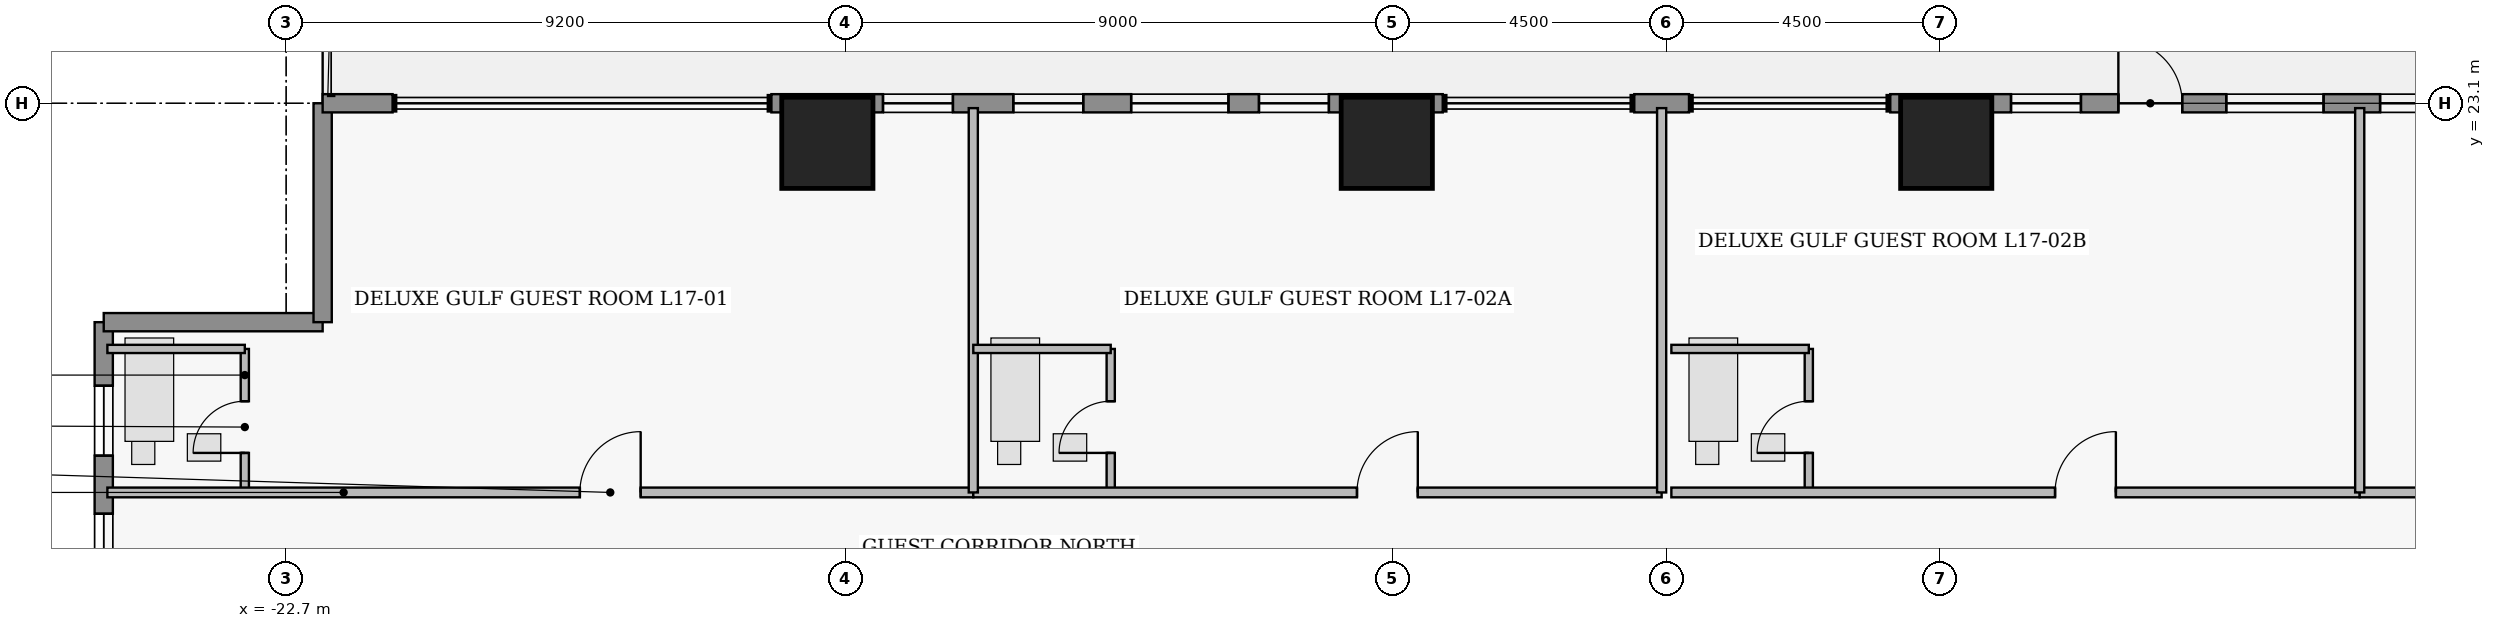
"""IFC4 building model, lengths in metres.
Left out: names, types, materials, properties, quantities, classifications, styles, units other than length and angle.
Written with IfcOpenShell. Run it as: python <this file> out.ifc"""

import sys

from ifc_helpers import new_model, si_unit, direction, frame, frame_2d, origin, origin_2d, place, context, subcontext, project, spatial, rectangle, extrude, element, fill, save


model = new_model("IFC4")
c1 = context("Model", 3, precision=1e-05, world=origin(), true_north=direction((0.0, 1.0)))
c2 = subcontext(c1, "Body", "Model", "MODEL_VIEW")
j1 = project(units=[si_unit("LENGTHUNIT", "METRE"), si_unit("PLANEANGLEUNIT", "RADIAN")], contexts=[c1])
p1 = place(None, origin())
s1 = spatial("IfcSite", under=j1, at=p1, CompositionType="ELEMENT")
p2 = place(p1, origin())
s2 = spatial("IfcBuilding", under=s1, at=p2, CompositionType="ELEMENT")
p3 = place(p2, frame((0.0, 0.0, 71.4)))
s3 = spatial("IfcBuildingStorey", under=s2, at=p3, CompositionType="ELEMENT", Elevation=71.4)
for number, where, z_axis, x_axis in (
    (1, (-13.8, 22.45, 0.0), (0.0, 0.0, 1.0), (1.0, 0.0, 0.0)),
    (2, (-4.6, 22.45, 0.0), (0.0, 0.0, 1.0), (1.0, 0.0, 0.0)),
    (3, (4.6, 22.45, 0.0), (0.0, 0.0, 1.0), (1.0, 0.0, 0.0)),
):
    element("IfcColumn", number, at=place(p3, frame(where, z_axis=z_axis, x_axis=x_axis)), inside=s3, PredefinedType="COLUMN", context=c2, shape_type="SweptSolid", body=[
        extrude(rectangle(XDim=1.5, YDim=1.5, at=origin_2d()), origin(), (0.0, 0.0, 1.0), 3.65),
    ])
p4 = place(p3, frame((-25.7, 14.4, 0.0), z_axis=(0.0, 0.0, 1.0), x_axis=(0.0, 1.0, 0.0)))
e4 = element("IfcWall", 4, at=p4, inside=s3, PredefinedType="STANDARD", context=c2, shape_type="SweptSolid", body=[
    extrude(rectangle(XDim=5.1, YDim=0.3, at=frame_2d((2.55, 0.0))), origin(), (0.0, 0.0, 1.0), 3.43),
])
p5 = place(p4, frame((0.8, 0.0, 0.95)))
e5 = element("IfcOpeningElement", 5, at=p5, cuts=e4, PredefinedType="OPENING", context=c2, shape_type="SweptSolid", body=[
    extrude(rectangle(XDim=1.15, YDim=1.55, at=frame_2d((0.575, 0.775))), frame((0.0, 0.16, 0.0), z_axis=(0.0, -1.0, 0.0), x_axis=(1.0, 0.0, 0.0)), (0.0, 0.0, 1.0), 0.32),
])
p6 = place(p4, frame((2.905, 0.0, 0.95)))
e6 = element("IfcOpeningElement", 6, at=p6, cuts=e4, PredefinedType="OPENING", context=c2, shape_type="SweptSolid", body=[
    extrude(rectangle(XDim=1.15, YDim=1.55, at=frame_2d((0.575, 0.775))), frame((0.0, 0.16, 0.0), z_axis=(0.0, -1.0, 0.0), x_axis=(1.0, 0.0, 0.0)), (0.0, 0.0, 1.0), 0.32),
])
p7 = place(p3, frame((-25.7, 19.5, 0.0), z_axis=(0.0, 0.0, 1.0), x_axis=(1.0, 0.0, 0.0)))
e7 = element("IfcWall", 7, at=p7, inside=s3, PredefinedType="STANDARD", context=c2, shape_type="SweptSolid", body=[
    extrude(rectangle(XDim=3.6, YDim=0.3, at=frame_2d((1.8, 0.0))), origin(), (0.0, 0.0, 1.0), 3.43),
])
p8 = place(p3, frame((-22.1, 19.5, 0.0), z_axis=(0.0, 0.0, 1.0), x_axis=(0.0, 1.0, 0.0)))
e8 = element("IfcWall", 8, at=p8, inside=s3, PredefinedType="STANDARD", context=c2, shape_type="SweptSolid", body=[
    extrude(rectangle(XDim=3.6, YDim=0.3, at=frame_2d((1.8, 0.0))), origin(), (0.0, 0.0, 1.0), 3.43),
])
p9 = place(p3, frame((-22.1, 23.1, 0.0), z_axis=(0.0, 0.0, 1.0), x_axis=(1.0, 0.0, 0.0)))
e9 = element("IfcWall", 9, at=p9, inside=s3, PredefinedType="STANDARD", context=c2, shape_type="SweptSolid", body=[
    extrude(rectangle(XDim=1.15, YDim=0.3, at=frame_2d((0.575, 0.0))), origin(), (0.0, 0.0, 1.0), 3.43),
])
p10 = place(p3, frame((-14.72, 23.1, 0.0), z_axis=(0.0, 0.0, 1.0), x_axis=(1.0, 0.0, 0.0)))
e10 = element("IfcWall", 10, at=p10, inside=s3, PredefinedType="STANDARD", context=c2, shape_type="SweptSolid", body=[
    extrude(rectangle(XDim=11.04, YDim=0.3, at=frame_2d((5.52, 0.0))), origin(), (0.0, 0.0, 1.0), 3.43),
])
p11 = place(p10, frame((5.916, 0.0, 0.85)))
e11 = element("IfcOpeningElement", 11, at=p11, cuts=e10, PredefinedType="OPENING", context=c2, shape_type="SweptSolid", body=[
    extrude(rectangle(XDim=1.6, YDim=1.8, at=frame_2d((0.8, 0.9))), frame((0.0, 0.16, 0.0), z_axis=(0.0, -1.0, 0.0), x_axis=(1.0, 0.0, 0.0)), (0.0, 0.0, 1.0), 0.32),
])
p12 = place(p10, frame((1.835, 0.0, 0.95)))
e12 = element("IfcOpeningElement", 12, at=p12, cuts=e10, PredefinedType="OPENING", context=c2, shape_type="SweptSolid", body=[
    extrude(rectangle(XDim=1.15, YDim=1.55, at=frame_2d((0.575, 0.775))), frame((0.0, 0.16, 0.0), z_axis=(0.0, -1.0, 0.0), x_axis=(1.0, 0.0, 0.0)), (0.0, 0.0, 1.0), 0.32),
])
p13 = place(p10, frame((3.978, 0.0, 0.95)))
e13 = element("IfcOpeningElement", 13, at=p13, cuts=e10, PredefinedType="OPENING", context=c2, shape_type="SweptSolid", body=[
    extrude(rectangle(XDim=1.15, YDim=1.55, at=frame_2d((0.575, 0.775))), frame((0.0, 0.16, 0.0), z_axis=(0.0, -1.0, 0.0), x_axis=(1.0, 0.0, 0.0)), (0.0, 0.0, 1.0), 0.32),
])
p14 = place(p10, frame((8.018, 0.0, 0.95)))
e14 = element("IfcOpeningElement", 14, at=p14, cuts=e10, PredefinedType="OPENING", context=c2, shape_type="SweptSolid", body=[
    extrude(rectangle(XDim=1.15, YDim=1.55, at=frame_2d((0.575, 0.775))), frame((0.0, 0.16, 0.0), z_axis=(0.0, -1.0, 0.0), x_axis=(1.0, 0.0, 0.0)), (0.0, 0.0, 1.0), 0.32),
])
p15 = place(p3, frame((-0.53, 23.1, 0.0), z_axis=(0.0, 0.0, 1.0), x_axis=(1.0, 0.0, 0.0)))
e15 = element("IfcWall", 15, at=p15, inside=s3, PredefinedType="STANDARD", context=c2, shape_type="SweptSolid", body=[
    extrude(rectangle(XDim=0.9, YDim=0.3, at=frame_2d((0.45, 0.0))), origin(), (0.0, 0.0, 1.0), 3.43),
])
p16 = place(p3, frame((3.68, 23.1, 0.0), z_axis=(0.0, 0.0, 1.0), x_axis=(1.0, 0.0, 0.0)))
e16 = element("IfcWall", 16, at=p16, inside=s3, PredefinedType="STANDARD", context=c2, shape_type="SweptSolid", body=[
    extrude(rectangle(XDim=11.04, YDim=0.3, at=frame_2d((5.52, 0.0))), origin(), (0.0, 0.0, 1.0), 3.43),
])
p17 = place(p16, frame((3.751, 0.0, 0.0)))
e17 = element("IfcOpeningElement", 17, at=p17, cuts=e16, PredefinedType="OPENING", context=c2, shape_type="SweptSolid", body=[
    extrude(rectangle(XDim=1.05, YDim=2.2, at=frame_2d((0.525, 1.1))), frame((0.0, 0.16, 0.0), z_axis=(0.0, -1.0, 0.0), x_axis=(1.0, 0.0, 0.0)), (0.0, 0.0, 1.0), 0.32),
])
p18 = place(p16, frame((1.986, 0.0, 0.95)))
e18 = element("IfcOpeningElement", 18, at=p18, cuts=e16, PredefinedType="OPENING", context=c2, shape_type="SweptSolid", body=[
    extrude(rectangle(XDim=1.15, YDim=1.55, at=frame_2d((0.575, 0.775))), frame((0.0, 0.16, 0.0), z_axis=(0.0, -1.0, 0.0), x_axis=(1.0, 0.0, 0.0)), (0.0, 0.0, 1.0), 0.32),
])
p19 = place(p16, frame((5.525, 0.0, 0.85)))
e19 = element("IfcOpeningElement", 19, at=p19, cuts=e16, PredefinedType="OPENING", context=c2, shape_type="SweptSolid", body=[
    extrude(rectangle(XDim=1.6, YDim=1.8, at=frame_2d((0.8, 0.9))), frame((0.0, 0.16, 0.0), z_axis=(0.0, -1.0, 0.0), x_axis=(1.0, 0.0, 0.0)), (0.0, 0.0, 1.0), 0.32),
])
p20 = place(p16, frame((8.055, 0.0, 0.95)))
e20 = element("IfcOpeningElement", 20, at=p20, cuts=e16, PredefinedType="OPENING", context=c2, shape_type="SweptSolid", body=[
    extrude(rectangle(XDim=1.15, YDim=1.55, at=frame_2d((0.575, 0.775))), frame((0.0, 0.16, 0.0), z_axis=(0.0, -1.0, 0.0), x_axis=(1.0, 0.0, 0.0)), (0.0, 0.0, 1.0), 0.32),
])
p21 = place(p3, frame((-23.38, 16.7, 0.0), z_axis=(0.0, 0.0, 1.0), x_axis=(0.0, 1.0, 0.0)))
e21 = element("IfcWall", 21, at=p21, inside=s3, PredefinedType="PLUMBINGWALL", context=c2, shape_type="SweptSolid", body=[
    extrude(rectangle(XDim=2.36, YDim=0.135, at=frame_2d((1.18, 0.0))), origin(), (0.0, 0.0, 1.0), 3.43),
])
p22 = place(p21, frame((0.65, 0.0, 0.0)))
e22 = element("IfcOpeningElement", 22, at=p22, cuts=e21, PredefinedType="OPENING", context=c2, shape_type="SweptSolid", body=[
    extrude(rectangle(XDim=0.85, YDim=2.1, at=frame_2d((0.425, 1.05))), frame((0.0, 0.077, 0.0), z_axis=(0.0, -1.0, 0.0), x_axis=(1.0, 0.0, 0.0)), (0.0, 0.0, 1.0), 0.155),
])
p23 = place(p3, frame((-25.64, 16.7, 0.0), z_axis=(0.0, 0.0, 1.0), x_axis=(1.0, 0.0, 0.0)))
e23 = element("IfcWall", 23, at=p23, inside=s3, PredefinedType="PARTITIONING", context=c2, shape_type="SweptSolid", body=[
    extrude(rectangle(XDim=14.24, YDim=0.16, at=frame_2d((7.12, 0.0))), origin(), (0.0, 0.0, 1.0), 2.973),
])
p24 = place(p23, frame((7.77, 0.0, 0.0)))
e24 = element("IfcOpeningElement", 24, at=p24, cuts=e23, PredefinedType="OPENING", context=c2, shape_type="SweptSolid", body=[
    extrude(rectangle(XDim=1.0, YDim=2.15, at=frame_2d((0.5, 1.075))), frame((0.0, 0.09, 0.0), z_axis=(0.0, -1.0, 0.0), x_axis=(1.0, 0.0, 0.0)), (0.0, 0.0, 1.0), 0.18),
])
p25 = place(p3, frame((-9.14, 16.7, 0.0), z_axis=(0.0, 0.0, 1.0), x_axis=(0.0, 1.0, 0.0)))
e25 = element("IfcWall", 25, at=p25, inside=s3, PredefinedType="PLUMBINGWALL", context=c2, shape_type="SweptSolid", body=[
    extrude(rectangle(XDim=2.36, YDim=0.135, at=frame_2d((1.18, 0.0))), origin(), (0.0, 0.0, 1.0), 3.43),
])
p26 = place(p25, frame((0.65, 0.0, 0.0)))
e26 = element("IfcOpeningElement", 26, at=p26, cuts=e25, PredefinedType="OPENING", context=c2, shape_type="SweptSolid", body=[
    extrude(rectangle(XDim=0.85, YDim=2.1, at=frame_2d((0.425, 1.05))), frame((0.0, 0.077, 0.0), z_axis=(0.0, -1.0, 0.0), x_axis=(1.0, 0.0, 0.0)), (0.0, 0.0, 1.0), 0.155),
])
p27 = place(p3, frame((-11.4, 16.7, 0.0), z_axis=(0.0, 0.0, 1.0), x_axis=(1.0, 0.0, 0.0)))
e27 = element("IfcWall", 27, at=p27, inside=s3, PredefinedType="PARTITIONING", context=c2, shape_type="SweptSolid", body=[
    extrude(rectangle(XDim=11.32, YDim=0.16, at=frame_2d((5.66, 0.0))), origin(), (0.0, 0.0, 1.0), 2.973),
])
p28 = place(p27, frame((6.31, 0.0, 0.0)))
e28 = element("IfcOpeningElement", 28, at=p28, cuts=e27, PredefinedType="OPENING", context=c2, shape_type="SweptSolid", body=[
    extrude(rectangle(XDim=1.0, YDim=2.15, at=frame_2d((0.5, 1.075))), frame((0.0, 0.09, 0.0), z_axis=(0.0, -1.0, 0.0), x_axis=(1.0, 0.0, 0.0)), (0.0, 0.0, 1.0), 0.18),
])
p29 = place(p3, frame((2.34, 16.7, 0.0), z_axis=(0.0, 0.0, 1.0), x_axis=(0.0, 1.0, 0.0)))
e29 = element("IfcWall", 29, at=p29, inside=s3, PredefinedType="PLUMBINGWALL", context=c2, shape_type="SweptSolid", body=[
    extrude(rectangle(XDim=2.36, YDim=0.135, at=frame_2d((1.18, 0.0))), origin(), (0.0, 0.0, 1.0), 3.43),
])
p30 = place(p29, frame((0.65, 0.0, 0.0)))
e30 = element("IfcOpeningElement", 30, at=p30, cuts=e29, PredefinedType="OPENING", context=c2, shape_type="SweptSolid", body=[
    extrude(rectangle(XDim=0.85, YDim=2.1, at=frame_2d((0.425, 1.05))), frame((0.0, 0.077, 0.0), z_axis=(0.0, -1.0, 0.0), x_axis=(1.0, 0.0, 0.0)), (0.0, 0.0, 1.0), 0.155),
])
p31 = place(p3, frame((0.08, 16.7, 0.0), z_axis=(0.0, 0.0, 1.0), x_axis=(1.0, 0.0, 0.0)))
e31 = element("IfcWall", 31, at=p31, inside=s3, PredefinedType="PARTITIONING", context=c2, shape_type="SweptSolid", body=[
    extrude(rectangle(XDim=11.32, YDim=0.16, at=frame_2d((5.66, 0.0))), origin(), (0.0, 0.0, 1.0), 2.973),
])
p32 = place(p31, frame((6.31, 0.0, 0.0)))
e32 = element("IfcOpeningElement", 32, at=p32, cuts=e31, PredefinedType="OPENING", context=c2, shape_type="SweptSolid", body=[
    extrude(rectangle(XDim=1.0, YDim=2.15, at=frame_2d((0.5, 1.075))), frame((0.0, 0.09, 0.0), z_axis=(0.0, -1.0, 0.0), x_axis=(1.0, 0.0, 0.0)), (0.0, 0.0, 1.0), 0.18),
])
p33 = place(p3, frame((11.4, 16.7, 0.0), z_axis=(0.0, 0.0, 1.0), x_axis=(1.0, 0.0, 0.0)))
e33 = element("IfcWall", 33, at=p33, inside=s3, PredefinedType="PARTITIONING", context=c2, shape_type="SweptSolid", body=[
    extrude(rectangle(XDim=14.24, YDim=0.16, at=frame_2d((7.12, 0.0))), origin(), (0.0, 0.0, 1.0), 2.973),
])
p34 = place(p33, frame((6.58, 0.0, 0.0)))
e34 = element("IfcOpeningElement", 34, at=p34, cuts=e33, PredefinedType="OPENING", context=c2, shape_type="SweptSolid", body=[
    extrude(rectangle(XDim=1.08, YDim=2.18, at=frame_2d((0.54, 1.09))), frame((0.0, 0.09, 0.0), z_axis=(0.0, -1.0, 0.0), x_axis=(1.0, 0.0, 0.0)), (0.0, 0.0, 1.0), 0.18),
])
p35 = place(p3, frame((-25.64, 19.06, 0.0), z_axis=(0.0, 0.0, 1.0), x_axis=(1.0, 0.0, 0.0)))
e35 = element("IfcWall", 35, at=p35, inside=s3, PredefinedType="PLUMBINGWALL", context=c2, shape_type="SweptSolid", body=[
    extrude(rectangle(XDim=2.26, YDim=0.135, at=frame_2d((1.13, 0.0))), origin(), (0.0, 0.0, 1.0), 3.43),
])
p36 = place(p3, frame((-11.4, 16.7, 0.0), z_axis=(0.0, 0.0, 1.0), x_axis=(0.0, 1.0, 0.0)))
e36 = element("IfcWall", 36, at=p36, inside=s3, PredefinedType="PARTITIONING", context=c2, shape_type="SweptSolid", body=[
    extrude(rectangle(XDim=6.32, YDim=0.15, at=frame_2d((3.16, 0.0))), origin(), (0.0, 0.0, 1.0), 3.43),
])
p37 = place(p3, frame((-11.4, 19.06, 0.0), z_axis=(0.0, 0.0, 1.0), x_axis=(1.0, 0.0, 0.0)))
e37 = element("IfcWall", 37, at=p37, inside=s3, PredefinedType="PLUMBINGWALL", context=c2, shape_type="SweptSolid", body=[
    extrude(rectangle(XDim=2.26, YDim=0.135, at=frame_2d((1.13, 0.0))), origin(), (0.0, 0.0, 1.0), 2.973),
])
p38 = place(p3, frame((-0.08, 16.7, 0.0), z_axis=(0.0, 0.0, 1.0), x_axis=(0.0, 1.0, 0.0)))
e38 = element("IfcWall", 38, at=p38, inside=s3, PredefinedType="PARTITIONING", context=c2, shape_type="SweptSolid", body=[
    extrude(rectangle(XDim=6.32, YDim=0.15, at=frame_2d((3.16, 0.0))), origin(), (0.0, 0.0, 1.0), 3.43),
])
p39 = place(p3, frame((0.08, 19.06, 0.0), z_axis=(0.0, 0.0, 1.0), x_axis=(1.0, 0.0, 0.0)))
e39 = element("IfcWall", 39, at=p39, inside=s3, PredefinedType="PLUMBINGWALL", context=c2, shape_type="SweptSolid", body=[
    extrude(rectangle(XDim=2.26, YDim=0.135, at=frame_2d((1.13, 0.0))), origin(), (0.0, 0.0, 1.0), 2.973),
])
p40 = place(p3, frame((11.4, 16.7, 0.0), z_axis=(0.0, 0.0, 1.0), x_axis=(0.0, 1.0, 0.0)))
e40 = element("IfcWall", 40, at=p40, inside=s3, PredefinedType="PARTITIONING", context=c2, shape_type="SweptSolid", body=[
    extrude(rectangle(XDim=6.32, YDim=0.15, at=frame_2d((3.16, 0.0))), origin(), (0.0, 0.0, 1.0), 3.43),
])
p41 = place(p5, origin())
e41 = element("IfcWindow", 41, at=p41, inside=s3, PartitioningType="SINGLE_PANEL", PredefinedType="WINDOW", context=c2, shape_type="SweptSolid", body=[
    extrude(rectangle(XDim=1.15, YDim=1.55, at=frame_2d((0.575, 0.775))), frame((0.0, 0.03, 0.0), z_axis=(0.0, -1.0, 0.0), x_axis=(1.0, 0.0, 0.0)), (0.0, 0.0, 1.0), 0.06),
])
fill(e5, e41)
p42 = place(p6, origin())
e42 = element("IfcWindow", 42, at=p42, inside=s3, PartitioningType="SINGLE_PANEL", PredefinedType="WINDOW", context=c2, shape_type="SweptSolid", body=[
    extrude(rectangle(XDim=1.15, YDim=1.55, at=frame_2d((0.575, 0.775))), frame((0.0, 0.03, 0.0), z_axis=(0.0, -1.0, 0.0), x_axis=(1.0, 0.0, 0.0)), (0.0, 0.0, 1.0), 0.06),
])
fill(e6, e42)
p43 = place(p11, origin())
e43 = element("IfcWindow", 43, at=p43, inside=s3, PartitioningType="SINGLE_PANEL", PredefinedType="WINDOW", context=c2, shape_type="SweptSolid", body=[
    extrude(rectangle(XDim=1.6, YDim=1.8, at=frame_2d((0.8, 0.9))), frame((0.0, 0.03, 0.0), z_axis=(0.0, -1.0, 0.0), x_axis=(1.0, 0.0, 0.0)), (0.0, 0.0, 1.0), 0.06),
])
fill(e11, e43)
p44 = place(p12, origin())
e44 = element("IfcWindow", 44, at=p44, inside=s3, PartitioningType="SINGLE_PANEL", PredefinedType="WINDOW", context=c2, shape_type="SweptSolid", body=[
    extrude(rectangle(XDim=1.15, YDim=1.55, at=frame_2d((0.575, 0.775))), frame((0.0, 0.03, 0.0), z_axis=(0.0, -1.0, 0.0), x_axis=(1.0, 0.0, 0.0)), (0.0, 0.0, 1.0), 0.06),
])
fill(e12, e44)
p45 = place(p13, origin())
e45 = element("IfcWindow", 45, at=p45, inside=s3, PartitioningType="SINGLE_PANEL", PredefinedType="WINDOW", context=c2, shape_type="SweptSolid", body=[
    extrude(rectangle(XDim=1.15, YDim=1.55, at=frame_2d((0.575, 0.775))), frame((0.0, 0.03, 0.0), z_axis=(0.0, -1.0, 0.0), x_axis=(1.0, 0.0, 0.0)), (0.0, 0.0, 1.0), 0.06),
])
fill(e13, e45)
p46 = place(p14, origin())
e46 = element("IfcWindow", 46, at=p46, inside=s3, PartitioningType="SINGLE_PANEL", PredefinedType="WINDOW", context=c2, shape_type="SweptSolid", body=[
    extrude(rectangle(XDim=1.15, YDim=1.55, at=frame_2d((0.575, 0.775))), frame((0.0, 0.03, 0.0), z_axis=(0.0, -1.0, 0.0), x_axis=(1.0, 0.0, 0.0)), (0.0, 0.0, 1.0), 0.06),
])
fill(e14, e46)
p47 = place(p17, origin())
e47 = element("IfcDoor", 47, at=p47, inside=s3, OperationType="SINGLE_SWING_LEFT", PredefinedType="DOOR", context=c2, shape_type="SweptSolid", body=[
    extrude(rectangle(XDim=1.05, YDim=2.2, at=frame_2d((0.525, 1.1))), frame((0.0, 0.025, 0.0), z_axis=(0.0, -1.0, 0.0), x_axis=(1.0, 0.0, 0.0)), (0.0, 0.0, 1.0), 0.05),
])
fill(e17, e47)
p48 = place(p18, origin())
e48 = element("IfcWindow", 48, at=p48, inside=s3, PartitioningType="SINGLE_PANEL", PredefinedType="WINDOW", context=c2, shape_type="SweptSolid", body=[
    extrude(rectangle(XDim=1.15, YDim=1.55, at=frame_2d((0.575, 0.775))), frame((0.0, 0.03, 0.0), z_axis=(0.0, -1.0, 0.0), x_axis=(1.0, 0.0, 0.0)), (0.0, 0.0, 1.0), 0.06),
])
fill(e18, e48)
p49 = place(p19, origin())
e49 = element("IfcWindow", 49, at=p49, inside=s3, PartitioningType="SINGLE_PANEL", PredefinedType="WINDOW", context=c2, shape_type="SweptSolid", body=[
    extrude(rectangle(XDim=1.6, YDim=1.8, at=frame_2d((0.8, 0.9))), frame((0.0, 0.03, 0.0), z_axis=(0.0, -1.0, 0.0), x_axis=(1.0, 0.0, 0.0)), (0.0, 0.0, 1.0), 0.06),
])
fill(e19, e49)
p50 = place(p20, origin())
e50 = element("IfcWindow", 50, at=p50, inside=s3, PartitioningType="SINGLE_PANEL", PredefinedType="WINDOW", context=c2, shape_type="SweptSolid", body=[
    extrude(rectangle(XDim=1.15, YDim=1.55, at=frame_2d((0.575, 0.775))), frame((0.0, 0.03, 0.0), z_axis=(0.0, -1.0, 0.0), x_axis=(1.0, 0.0, 0.0)), (0.0, 0.0, 1.0), 0.06),
])
fill(e20, e50)
p51 = place(p22, origin())
e51 = element("IfcDoor", 51, at=p51, inside=s3, OperationType="SINGLE_SWING_LEFT", PredefinedType="DOOR", context=c2, shape_type="SweptSolid", body=[
    extrude(rectangle(XDim=0.85, YDim=2.1, at=frame_2d((0.425, 1.05))), frame((0.0, 0.025, 0.0), z_axis=(0.0, -1.0, 0.0), x_axis=(1.0, 0.0, 0.0)), (0.0, 0.0, 1.0), 0.05),
])
fill(e22, e51)
p52 = place(p24, origin())
e52 = element("IfcDoor", 52, at=p52, inside=s3, OperationType="SINGLE_SWING_RIGHT", PredefinedType="DOOR", context=c2, shape_type="SweptSolid", body=[
    extrude(rectangle(XDim=1.0, YDim=2.15, at=frame_2d((0.5, 1.075))), frame((0.0, 0.025, 0.0), z_axis=(0.0, -1.0, 0.0), x_axis=(1.0, 0.0, 0.0)), (0.0, 0.0, 1.0), 0.05),
])
fill(e24, e52)
p53 = place(p26, origin())
e53 = element("IfcDoor", 53, at=p53, inside=s3, OperationType="SINGLE_SWING_LEFT", PredefinedType="DOOR", context=c2, shape_type="SweptSolid", body=[
    extrude(rectangle(XDim=0.85, YDim=2.1, at=frame_2d((0.425, 1.05))), frame((0.0, 0.025, 0.0), z_axis=(0.0, -1.0, 0.0), x_axis=(1.0, 0.0, 0.0)), (0.0, 0.0, 1.0), 0.05),
])
fill(e26, e53)
p54 = place(p28, origin())
e54 = element("IfcDoor", 54, at=p54, inside=s3, OperationType="SINGLE_SWING_RIGHT", PredefinedType="DOOR", context=c2, shape_type="SweptSolid", body=[
    extrude(rectangle(XDim=1.0, YDim=2.15, at=frame_2d((0.5, 1.075))), frame((0.0, 0.025, 0.0), z_axis=(0.0, -1.0, 0.0), x_axis=(1.0, 0.0, 0.0)), (0.0, 0.0, 1.0), 0.05),
])
fill(e28, e54)
p55 = place(p30, origin())
e55 = element("IfcDoor", 55, at=p55, inside=s3, OperationType="SINGLE_SWING_LEFT", PredefinedType="DOOR", context=c2, shape_type="SweptSolid", body=[
    extrude(rectangle(XDim=0.85, YDim=2.1, at=frame_2d((0.425, 1.05))), frame((0.0, 0.025, 0.0), z_axis=(0.0, -1.0, 0.0), x_axis=(1.0, 0.0, 0.0)), (0.0, 0.0, 1.0), 0.05),
])
fill(e30, e55)
p56 = place(p32, origin())
e56 = element("IfcDoor", 56, at=p56, inside=s3, OperationType="SINGLE_SWING_RIGHT", PredefinedType="DOOR", context=c2, shape_type="SweptSolid", body=[
    extrude(rectangle(XDim=1.0, YDim=2.15, at=frame_2d((0.5, 1.075))), frame((0.0, 0.025, 0.0), z_axis=(0.0, -1.0, 0.0), x_axis=(1.0, 0.0, 0.0)), (0.0, 0.0, 1.0), 0.05),
])
fill(e32, e56)
save(model, sys.argv[1])
